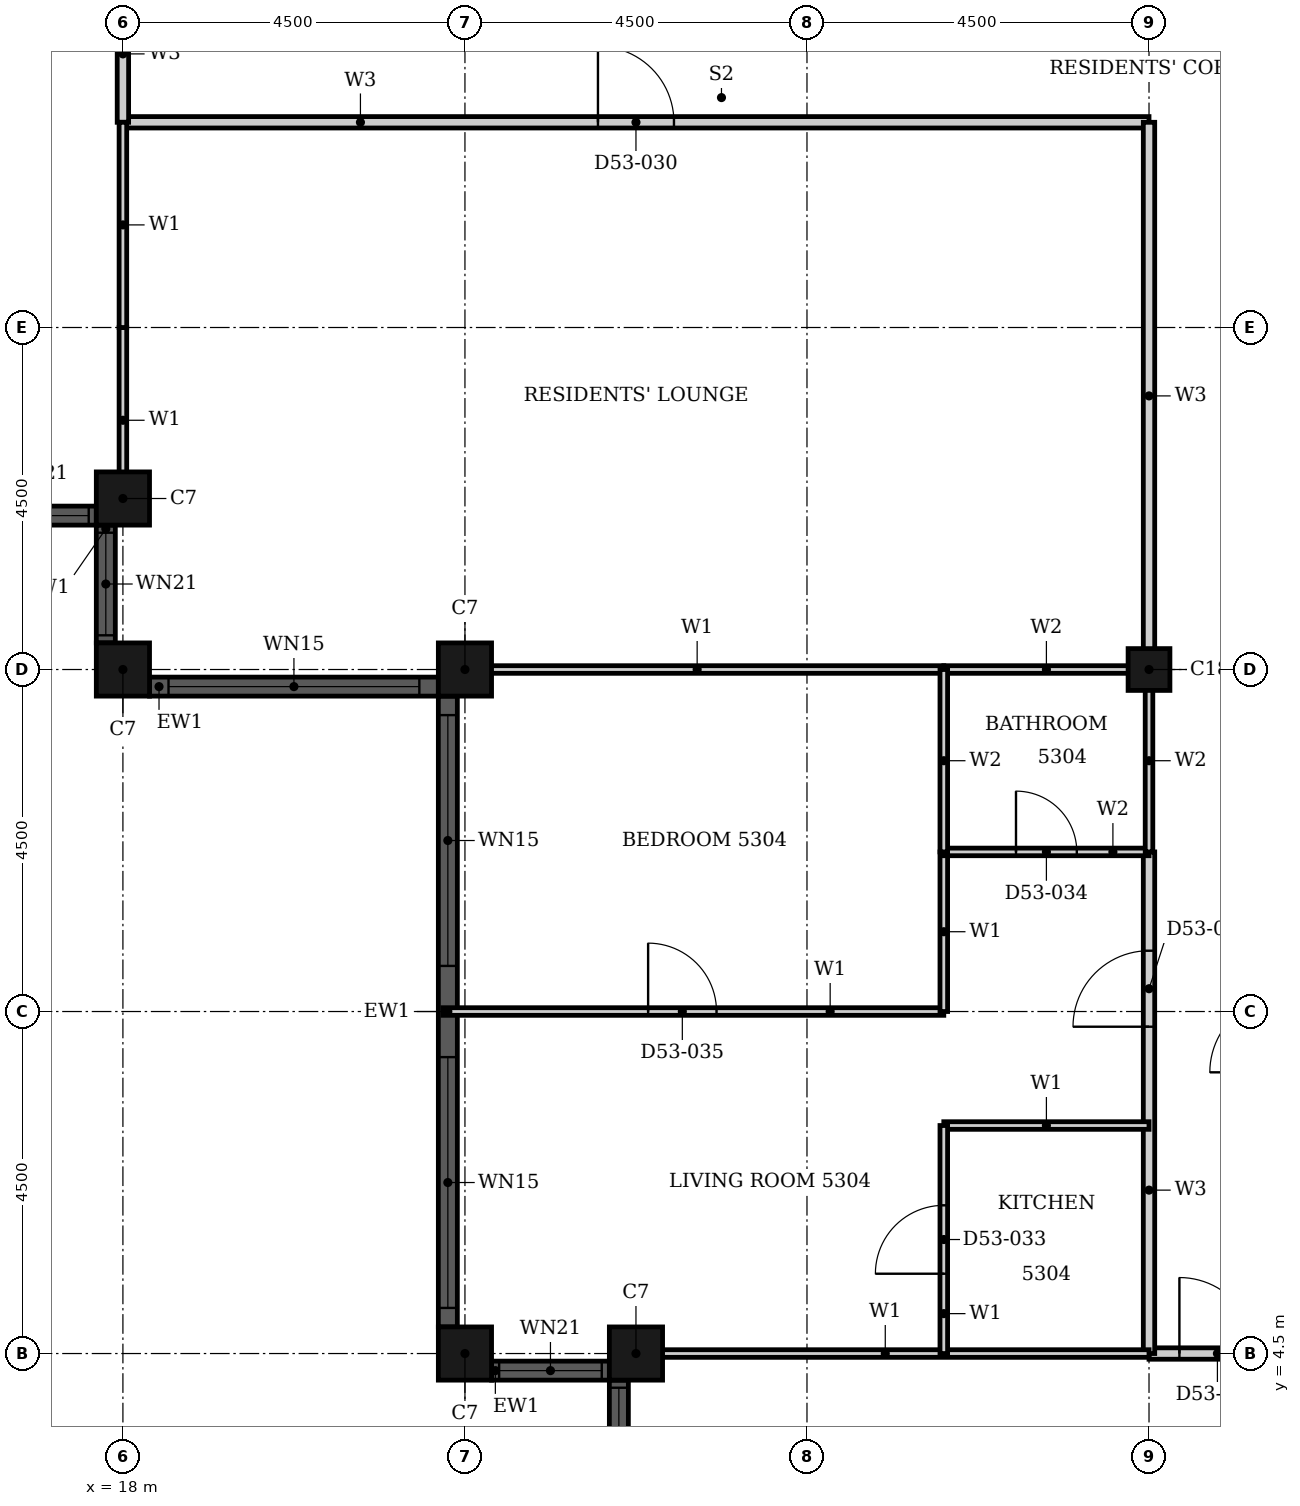
"""IFC4 building model, lengths in metres.
Left out: names, types, materials, properties, quantities, classifications, styles, units other than length and angle.
Written with IfcOpenShell. Run it as: python <this file> out.ifc"""

import sys

from ifc_helpers import new_model, si_unit, direction, frame, frame_2d, origin, origin_2d, place, context, subcontext, project, spatial, rectangle, hollow_rectangle, extrude, element, fill, save


model = new_model("IFC4")
c1 = context("Model", 3, precision=1e-05, world=origin(), true_north=direction((0.0, 1.0)))
c2 = subcontext(c1, "Body", "Model", "MODEL_VIEW")
j1 = project(units=[si_unit("LENGTHUNIT", "METRE"), si_unit("PLANEANGLEUNIT", "RADIAN")], contexts=[c1])
p1 = place(None, origin())
s1 = spatial("IfcSite", under=j1, at=p1, CompositionType="ELEMENT")
p2 = place(p1, origin())
s2 = spatial("IfcBuilding", under=s1, at=p2, CompositionType="ELEMENT")
p3 = place(p2, frame((0.0, 0.0, 210.9)))
s3 = spatial("IfcBuildingStorey", under=s2, at=p3, CompositionType="ELEMENT", Elevation=210.9)
for number, where, z_axis, x_axis in (
    (1, (18.0, 15.75, 0.0), (0.0, 0.0, 1.0), (1.0, 0.0, 0.0)),
    (2, (18.0, 13.5, 0.0), (0.0, 0.0, 1.0), (1.0, 0.0, 0.0)),
    (3, (22.5, 13.5, 0.0), (0.0, 0.0, 1.0), (1.0, 0.0, 0.0)),
    (4, (22.5, 4.5, 0.0), (0.0, 0.0, 1.0), (1.0, 0.0, 0.0)),
    (5, (24.75, 4.5, 0.0), (0.0, 0.0, 1.0), (1.0, 0.0, 0.0)),
):
    element("IfcColumn", number, at=place(p3, frame(where, z_axis=z_axis, x_axis=x_axis)), inside=s3, PredefinedType="COLUMN", context=c2, shape_type="SweptSolid", body=[
        extrude(hollow_rectangle(XDim=0.7, YDim=0.7, WallThickness=0.022, at=origin_2d()), origin(), (0.0, 0.0, 1.0), 3.7),
    ])
p4 = place(p3, frame((31.5, 13.5, 0.0), z_axis=(0.0, 0.0, 1.0), x_axis=(1.0, 0.0, 0.0)))
e6 = element("IfcColumn", 6, at=p4, inside=s3, PredefinedType="COLUMN", context=c2, shape_type="SweptSolid", body=[
    extrude(hollow_rectangle(XDim=0.55, YDim=0.55, WallThickness=0.018, at=origin_2d()), origin(), (0.0, 0.0, 1.0), 3.7),
])
p5 = place(p3, frame((16.1, 15.525, 0.0), z_axis=(0.0, 0.0, 1.0), x_axis=(1.0, 0.0, 0.0)))
e7 = element("IfcWall", 7, at=p5, inside=s3, PredefinedType="SOLIDWALL", context=c2, shape_type="SweptSolid", body=[
    extrude(rectangle(XDim=1.55, YDim=0.25, at=frame_2d((0.775, 0.0))), origin(), (0.0, 0.0, 1.0), 3.7),
])
p6 = place(p5, frame((0.1, 0.0, 0.9)))
e8 = element("IfcOpeningElement", 8, at=p6, cuts=e7, PredefinedType="OPENING", context=c2, shape_type="SweptSolid", body=[
    extrude(rectangle(XDim=1.35, YDim=1.85, at=frame_2d((0.675, 0.925))), frame((0.0, 0.135, 0.0), z_axis=(0.0, -1.0, 0.0), x_axis=(1.0, 0.0, 0.0)), (0.0, 0.0, 1.0), 0.27),
])
p7 = place(p3, frame((17.775, 15.4, 0.0), z_axis=(0.0, 0.0, 1.0), x_axis=(0.0, -1.0, 0.0)))
e9 = element("IfcWall", 9, at=p7, inside=s3, PredefinedType="SOLIDWALL", context=c2, shape_type="SweptSolid", body=[
    extrude(rectangle(XDim=1.55, YDim=0.25, at=frame_2d((0.775, 0.0))), origin(), (0.0, 0.0, 1.0), 3.7),
])
p8 = place(p7, frame((0.1, 0.0, 0.9)))
e10 = element("IfcOpeningElement", 10, at=p8, cuts=e9, PredefinedType="OPENING", context=c2, shape_type="SweptSolid", body=[
    extrude(rectangle(XDim=1.35, YDim=1.85, at=frame_2d((0.675, 0.925))), frame((0.0, 0.135, 0.0), z_axis=(0.0, -1.0, 0.0), x_axis=(1.0, 0.0, 0.0)), (0.0, 0.0, 1.0), 0.27),
])
p9 = place(p3, frame((18.35, 13.275, 0.0), z_axis=(0.0, 0.0, 1.0), x_axis=(1.0, 0.0, 0.0)))
e11 = element("IfcWall", 11, at=p9, inside=s3, PredefinedType="SOLIDWALL", context=c2, shape_type="SweptSolid", body=[
    extrude(rectangle(XDim=3.8, YDim=0.25, at=frame_2d((1.9, 0.0))), origin(), (0.0, 0.0, 1.0), 3.7),
])
p10 = place(p9, frame((0.25, 0.0, 0.45)))
e12 = element("IfcOpeningElement", 12, at=p10, cuts=e11, PredefinedType="OPENING", context=c2, shape_type="SweptSolid", body=[
    extrude(rectangle(XDim=3.3, YDim=2.3, at=frame_2d((1.65, 1.15))), frame((0.0, 0.135, 0.0), z_axis=(0.0, -1.0, 0.0), x_axis=(1.0, 0.0, 0.0)), (0.0, 0.0, 1.0), 0.27),
])
p11 = place(p3, frame((22.275, 13.15, 0.0), z_axis=(0.0, 0.0, 1.0), x_axis=(0.0, -1.0, 0.0)))
e13 = element("IfcWall", 13, at=p11, inside=s3, PredefinedType="SOLIDWALL", context=c2, shape_type="SweptSolid", body=[
    extrude(rectangle(XDim=8.3, YDim=0.25, at=frame_2d((4.15, 0.0))), origin(), (0.0, 0.0, 1.0), 3.7),
])
p12 = place(p11, frame((0.25, 0.0, 0.45)))
e14 = element("IfcOpeningElement", 14, at=p12, cuts=e13, PredefinedType="OPENING", context=c2, shape_type="SweptSolid", body=[
    extrude(rectangle(XDim=3.3, YDim=2.3, at=frame_2d((1.65, 1.15))), frame((0.0, 0.135, 0.0), z_axis=(0.0, -1.0, 0.0), x_axis=(1.0, 0.0, 0.0)), (0.0, 0.0, 1.0), 0.27),
])
p13 = place(p11, frame((4.75, 0.0, 0.45)))
e15 = element("IfcOpeningElement", 15, at=p13, cuts=e13, PredefinedType="OPENING", context=c2, shape_type="SweptSolid", body=[
    extrude(rectangle(XDim=3.3, YDim=2.3, at=frame_2d((1.65, 1.15))), frame((0.0, 0.135, 0.0), z_axis=(0.0, -1.0, 0.0), x_axis=(1.0, 0.0, 0.0)), (0.0, 0.0, 1.0), 0.27),
])
p14 = place(p3, frame((22.85, 4.275, 0.0), z_axis=(0.0, 0.0, 1.0), x_axis=(1.0, 0.0, 0.0)))
e16 = element("IfcWall", 16, at=p14, inside=s3, PredefinedType="SOLIDWALL", context=c2, shape_type="SweptSolid", body=[
    extrude(rectangle(XDim=1.55, YDim=0.25, at=frame_2d((0.775, 0.0))), origin(), (0.0, 0.0, 1.0), 3.7),
])
p15 = place(p14, frame((0.1, 0.0, 0.9)))
e17 = element("IfcOpeningElement", 17, at=p15, cuts=e16, PredefinedType="OPENING", context=c2, shape_type="SweptSolid", body=[
    extrude(rectangle(XDim=1.35, YDim=1.85, at=frame_2d((0.675, 0.925))), frame((0.0, 0.135, 0.0), z_axis=(0.0, -1.0, 0.0), x_axis=(1.0, 0.0, 0.0)), (0.0, 0.0, 1.0), 0.27),
])
p16 = place(p3, frame((24.525, 4.15, 0.0), z_axis=(0.0, 0.0, 1.0), x_axis=(0.0, -1.0, 0.0)))
e18 = element("IfcWall", 18, at=p16, inside=s3, PredefinedType="SOLIDWALL", context=c2, shape_type="SweptSolid", body=[
    extrude(rectangle(XDim=1.55, YDim=0.25, at=frame_2d((0.775, 0.0))), origin(), (0.0, 0.0, 1.0), 3.7),
])
p17 = place(p16, frame((0.1, 0.0, 0.9)))
e19 = element("IfcOpeningElement", 19, at=p17, cuts=e18, PredefinedType="OPENING", context=c2, shape_type="SweptSolid", body=[
    extrude(rectangle(XDim=1.35, YDim=1.85, at=frame_2d((0.675, 0.925))), frame((0.0, 0.135, 0.0), z_axis=(0.0, -1.0, 0.0), x_axis=(1.0, 0.0, 0.0)), (0.0, 0.0, 1.0), 0.27),
])
p18 = place(p3, frame((18.0, 20.7, 0.0), z_axis=(0.0, 0.0, 1.0), x_axis=(1.0, 0.0, 0.0)))
e20 = element("IfcWall", 20, at=p18, inside=s3, PredefinedType="PARTITIONING", context=c2, shape_type="SweptSolid", body=[
    extrude(rectangle(XDim=13.5, YDim=0.15, at=frame_2d((6.75, 0.0))), origin(), (0.0, 0.0, 1.0), 3.4),
])
p19 = place(p18, frame((6.25, 0.0, 0.0)))
e21 = element("IfcOpeningElement", 21, at=p19, cuts=e20, PredefinedType="OPENING", context=c2, shape_type="SweptSolid", body=[
    extrude(rectangle(XDim=1.0, YDim=2.1, at=frame_2d((0.5, 1.05))), frame((0.0, 0.085, 0.0), z_axis=(0.0, -1.0, 0.0), x_axis=(1.0, 0.0, 0.0)), (0.0, 0.0, 1.0), 0.17),
])
p20 = place(p3, frame((31.5, 4.5, 0.0), z_axis=(0.0, 0.0, 1.0), x_axis=(1.0, 0.0, 0.0)))
e22 = element("IfcWall", 22, at=p20, inside=s3, PredefinedType="PARTITIONING", context=c2, shape_type="SweptSolid", body=[
    extrude(rectangle(XDim=1.8, YDim=0.15, at=frame_2d((0.9, 0.0))), origin(), (0.0, 0.0, 1.0), 3.4),
])
p21 = place(p20, frame((0.4, 0.0, 0.0)))
e23 = element("IfcOpeningElement", 23, at=p21, cuts=e22, PredefinedType="OPENING", context=c2, shape_type="SweptSolid", body=[
    extrude(rectangle(XDim=1.0, YDim=2.1, at=frame_2d((0.5, 1.05))), frame((0.0, 0.085, 0.0), z_axis=(0.0, -1.0, 0.0), x_axis=(1.0, 0.0, 0.0)), (0.0, 0.0, 1.0), 0.17),
])
p22 = place(p3, frame((18.0, 20.7, 0.0), z_axis=(0.0, 0.0, 1.0), x_axis=(0.0, 1.0, 0.0)))
e24 = element("IfcWall", 24, at=p22, inside=s3, PredefinedType="PARTITIONING", context=c2, shape_type="SweptSolid", body=[
    extrude(rectangle(XDim=1.8, YDim=0.15, at=frame_2d((0.9, 0.0))), origin(), (0.0, 0.0, 1.0), 3.4),
])
p23 = place(p3, frame((31.5, 4.5, 0.0), z_axis=(0.0, 0.0, 1.0), x_axis=(0.0, 1.0, 0.0)))
e25 = element("IfcWall", 25, at=p23, inside=s3, PredefinedType="PARTITIONING", context=c2, shape_type="SweptSolid", body=[
    extrude(rectangle(XDim=6.6, YDim=0.15, at=frame_2d((3.3, 0.0))), origin(), (0.0, 0.0, 1.0), 2.68),
])
p24 = place(p23, frame((4.3, 0.0, 0.0)))
e26 = element("IfcOpeningElement", 26, at=p24, cuts=e25, PredefinedType="OPENING", context=c2, shape_type="SweptSolid", body=[
    extrude(rectangle(XDim=1.0, YDim=2.2, at=frame_2d((0.5, 1.1))), frame((0.0, 0.085, 0.0), z_axis=(0.0, -1.0, 0.0), x_axis=(1.0, 0.0, 0.0)), (0.0, 0.0, 1.0), 0.17),
])
p25 = place(p3, frame((31.5, 13.5, 0.0), z_axis=(0.0, 0.0, 1.0), x_axis=(0.0, 1.0, 0.0)))
e27 = element("IfcWall", 27, at=p25, inside=s3, PredefinedType="PARTITIONING", context=c2, shape_type="SweptSolid", body=[
    extrude(rectangle(XDim=7.2, YDim=0.15, at=frame_2d((3.6, 0.0))), origin(), (0.0, 0.0, 1.0), 3.4),
])
p26 = place(p3, frame((22.31, 13.5, 0.0), z_axis=(0.0, 0.0, 1.0), x_axis=(1.0, 0.0, 0.0)))
e28 = element("IfcWall", 28, at=p26, inside=s3, PredefinedType="PARTITIONING", context=c2, shape_type="SweptSolid", body=[
    extrude(rectangle(XDim=6.49, YDim=0.1, at=frame_2d((3.245, 0.0))), origin(), (0.0, 0.0, 1.0), 2.48),
])
p27 = place(p3, frame((24.56, 4.5, 0.0), z_axis=(0.0, 0.0, 1.0), x_axis=(1.0, 0.0, 0.0)))
e29 = element("IfcWall", 29, at=p27, inside=s3, PredefinedType="PARTITIONING", context=c2, shape_type="SweptSolid", body=[
    extrude(rectangle(XDim=6.94, YDim=0.1, at=frame_2d((3.47, 0.0))), origin(), (0.0, 0.0, 1.0), 3.4),
])
p28 = place(p3, frame((28.8, 7.5, 0.0), z_axis=(0.0, 0.0, 1.0), x_axis=(1.0, 0.0, 0.0)))
e30 = element("IfcWall", 30, at=p28, inside=s3, PredefinedType="PARTITIONING", context=c2, shape_type="SweptSolid", body=[
    extrude(rectangle(XDim=2.7, YDim=0.1, at=frame_2d((1.35, 0.0))), origin(), (0.0, 0.0, 1.0), 3.4),
])
p29 = place(p3, frame((22.21, 9.0, 0.0), z_axis=(0.0, 0.0, 1.0), x_axis=(1.0, 0.0, 0.0)))
e31 = element("IfcWall", 31, at=p29, inside=s3, PredefinedType="PARTITIONING", context=c2, shape_type="SweptSolid", body=[
    extrude(rectangle(XDim=6.59, YDim=0.1, at=frame_2d((3.295, 0.0))), origin(), (0.0, 0.0, 1.0), 3.4),
])
p30 = place(p29, frame((2.7, 0.0, 0.0)))
e32 = element("IfcOpeningElement", 32, at=p30, cuts=e31, PredefinedType="OPENING", context=c2, shape_type="SweptSolid", body=[
    extrude(rectangle(XDim=0.9, YDim=2.1, at=frame_2d((0.45, 1.05))), frame((0.0, 0.06, 0.0), z_axis=(0.0, -1.0, 0.0), x_axis=(1.0, 0.0, 0.0)), (0.0, 0.0, 1.0), 0.12),
])
p31 = place(p3, frame((18.0, 15.56, 0.0), z_axis=(0.0, 0.0, 1.0), x_axis=(0.0, 1.0, 0.0)))
e33 = element("IfcWall", 33, at=p31, inside=s3, PredefinedType="PARTITIONING", context=c2, shape_type="SweptSolid", body=[
    extrude(rectangle(XDim=2.439, YDim=0.1, at=frame_2d((1.219, 0.0))), origin(), (0.0, 0.0, 1.0), 3.4),
])
p32 = place(p3, frame((18.0, 18.0, 0.0), z_axis=(0.0, 0.0, 1.0), x_axis=(0.0, 1.0, 0.0)))
e34 = element("IfcWall", 34, at=p32, inside=s3, PredefinedType="PARTITIONING", context=c2, shape_type="SweptSolid", body=[
    extrude(rectangle(XDim=2.7, YDim=0.1, at=frame_2d((1.35, 0.0))), origin(), (0.0, 0.0, 1.0), 3.4),
])
p33 = place(p3, frame((28.8, 9.0, 0.0), z_axis=(0.0, 0.0, 1.0), x_axis=(0.0, 1.0, 0.0)))
e35 = element("IfcWall", 35, at=p33, inside=s3, PredefinedType="PARTITIONING", context=c2, shape_type="SweptSolid", body=[
    extrude(rectangle(XDim=2.1, YDim=0.1, at=frame_2d((1.05, 0.0))), origin(), (0.0, 0.0, 1.0), 3.4),
])
p34 = place(p3, frame((28.8, 4.5, 0.0), z_axis=(0.0, 0.0, 1.0), x_axis=(0.0, 1.0, 0.0)))
e36 = element("IfcWall", 36, at=p34, inside=s3, PredefinedType="PARTITIONING", context=c2, shape_type="SweptSolid", body=[
    extrude(rectangle(XDim=3.0, YDim=0.1, at=frame_2d((1.5, 0.0))), origin(), (0.0, 0.0, 1.0), 3.4),
])
p35 = place(p34, frame((1.05, 0.0, 0.0)))
e37 = element("IfcOpeningElement", 37, at=p35, cuts=e36, PredefinedType="OPENING", context=c2, shape_type="SweptSolid", body=[
    extrude(rectangle(XDim=0.9, YDim=2.1, at=frame_2d((0.45, 1.05))), frame((0.0, 0.06, 0.0), z_axis=(0.0, -1.0, 0.0), x_axis=(1.0, 0.0, 0.0)), (0.0, 0.0, 1.0), 0.12),
])
p36 = place(p3, frame((28.8, 11.1, 0.0), z_axis=(0.0, 0.0, 1.0), x_axis=(1.0, 0.0, 0.0)))
e38 = element("IfcWall", 38, at=p36, inside=s3, PredefinedType="PARTITIONING", context=c2, shape_type="SweptSolid", body=[
    extrude(rectangle(XDim=2.7, YDim=0.1, at=frame_2d((1.35, 0.0))), origin(), (0.0, 0.0, 1.0), 3.4),
])
p37 = place(p36, frame((0.95, 0.0, 0.0)))
e39 = element("IfcOpeningElement", 39, at=p37, cuts=e38, PredefinedType="OPENING", context=c2, shape_type="SweptSolid", body=[
    extrude(rectangle(XDim=0.8, YDim=2.1, at=frame_2d((0.4, 1.05))), frame((0.0, 0.06, 0.0), z_axis=(0.0, -1.0, 0.0), x_axis=(1.0, 0.0, 0.0)), (0.0, 0.0, 1.0), 0.12),
])
p38 = place(p3, frame((28.8, 13.5, 0.0), z_axis=(0.0, 0.0, 1.0), x_axis=(1.0, 0.0, 0.0)))
e40 = element("IfcWall", 40, at=p38, inside=s3, PredefinedType="PARTITIONING", context=c2, shape_type="SweptSolid", body=[
    extrude(rectangle(XDim=2.7, YDim=0.1, at=frame_2d((1.35, 0.0))), origin(), (0.0, 0.0, 1.0), 2.48),
])
p39 = place(p3, frame((28.8, 11.1, 0.0), z_axis=(0.0, 0.0, 1.0), x_axis=(0.0, 1.0, 0.0)))
e41 = element("IfcWall", 41, at=p39, inside=s3, PredefinedType="PARTITIONING", context=c2, shape_type="SweptSolid", body=[
    extrude(rectangle(XDim=2.4, YDim=0.1, at=frame_2d((1.2, 0.0))), origin(), (0.0, 0.0, 1.0), 3.4),
])
p40 = place(p3, frame((31.5, 11.1, 0.0), z_axis=(0.0, 0.0, 1.0), x_axis=(0.0, 1.0, 0.0)))
e42 = element("IfcWall", 42, at=p40, inside=s3, PredefinedType="PARTITIONING", context=c2, shape_type="SweptSolid", body=[
    extrude(rectangle(XDim=2.4, YDim=0.1, at=frame_2d((1.2, 0.0))), origin(), (0.0, 0.0, 1.0), 2.68),
])
p41 = place(p6, origin())
e43 = element("IfcWindow", 43, at=p41, inside=s3, PartitioningType="SINGLE_PANEL", PredefinedType="WINDOW", context=c2, shape_type="SweptSolid", body=[
    extrude(rectangle(XDim=1.35, YDim=1.85, at=frame_2d((0.675, 0.925))), frame((0.0, 0.03, 0.0), z_axis=(0.0, -1.0, 0.0), x_axis=(1.0, 0.0, 0.0)), (0.0, 0.0, 1.0), 0.06),
])
fill(e8, e43)
p42 = place(p8, origin())
e44 = element("IfcWindow", 44, at=p42, inside=s3, PartitioningType="SINGLE_PANEL", PredefinedType="WINDOW", context=c2, shape_type="SweptSolid", body=[
    extrude(rectangle(XDim=1.35, YDim=1.85, at=frame_2d((0.675, 0.925))), frame((0.0, 0.03, 0.0), z_axis=(0.0, -1.0, 0.0), x_axis=(1.0, 0.0, 0.0)), (0.0, 0.0, 1.0), 0.06),
])
fill(e10, e44)
p43 = place(p10, origin())
e45 = element("IfcWindow", 45, at=p43, inside=s3, PartitioningType="SINGLE_PANEL", PredefinedType="WINDOW", context=c2, shape_type="SweptSolid", body=[
    extrude(rectangle(XDim=3.3, YDim=2.3, at=frame_2d((1.65, 1.15))), frame((0.0, 0.03, 0.0), z_axis=(0.0, -1.0, 0.0), x_axis=(1.0, 0.0, 0.0)), (0.0, 0.0, 1.0), 0.06),
])
fill(e12, e45)
p44 = place(p12, origin())
e46 = element("IfcWindow", 46, at=p44, inside=s3, PartitioningType="SINGLE_PANEL", PredefinedType="WINDOW", context=c2, shape_type="SweptSolid", body=[
    extrude(rectangle(XDim=3.3, YDim=2.3, at=frame_2d((1.65, 1.15))), frame((0.0, 0.03, 0.0), z_axis=(0.0, -1.0, 0.0), x_axis=(1.0, 0.0, 0.0)), (0.0, 0.0, 1.0), 0.06),
])
fill(e14, e46)
p45 = place(p13, origin())
e47 = element("IfcWindow", 47, at=p45, inside=s3, PartitioningType="SINGLE_PANEL", PredefinedType="WINDOW", context=c2, shape_type="SweptSolid", body=[
    extrude(rectangle(XDim=3.3, YDim=2.3, at=frame_2d((1.65, 1.15))), frame((0.0, 0.03, 0.0), z_axis=(0.0, -1.0, 0.0), x_axis=(1.0, 0.0, 0.0)), (0.0, 0.0, 1.0), 0.06),
])
fill(e15, e47)
p46 = place(p15, origin())
e48 = element("IfcWindow", 48, at=p46, inside=s3, PartitioningType="SINGLE_PANEL", PredefinedType="WINDOW", context=c2, shape_type="SweptSolid", body=[
    extrude(rectangle(XDim=1.35, YDim=1.85, at=frame_2d((0.675, 0.925))), frame((0.0, 0.03, 0.0), z_axis=(0.0, -1.0, 0.0), x_axis=(1.0, 0.0, 0.0)), (0.0, 0.0, 1.0), 0.06),
])
fill(e17, e48)
p47 = place(p17, origin())
e49 = element("IfcWindow", 49, at=p47, inside=s3, PartitioningType="SINGLE_PANEL", PredefinedType="WINDOW", context=c2, shape_type="SweptSolid", body=[
    extrude(rectangle(XDim=1.35, YDim=1.85, at=frame_2d((0.675, 0.925))), frame((0.0, 0.03, 0.0), z_axis=(0.0, -1.0, 0.0), x_axis=(1.0, 0.0, 0.0)), (0.0, 0.0, 1.0), 0.06),
])
fill(e19, e49)
p48 = place(p19, origin())
e50 = element("IfcDoor", 50, at=p48, inside=s3, OperationType="SINGLE_SWING_RIGHT", PredefinedType="DOOR", context=c2, shape_type="SweptSolid", body=[
    extrude(rectangle(XDim=1.0, YDim=2.1, at=frame_2d((0.5, 1.05))), frame((0.0, 0.025, 0.0), z_axis=(0.0, -1.0, 0.0), x_axis=(1.0, 0.0, 0.0)), (0.0, 0.0, 1.0), 0.05),
])
fill(e21, e50)
p49 = place(p24, origin())
e51 = element("IfcDoor", 51, at=p49, inside=s3, OperationType="SINGLE_SWING_LEFT", PredefinedType="DOOR", context=c2, shape_type="SweptSolid", body=[
    extrude(rectangle(XDim=1.0, YDim=2.2, at=frame_2d((0.5, 1.1))), frame((0.0, 0.025, 0.0), z_axis=(0.0, -1.0, 0.0), x_axis=(1.0, 0.0, 0.0)), (0.0, 0.0, 1.0), 0.05),
])
fill(e26, e51)
p50 = place(p35, origin())
e52 = element("IfcDoor", 52, at=p50, inside=s3, OperationType="SINGLE_SWING_RIGHT", PredefinedType="DOOR", context=c2, shape_type="SweptSolid", body=[
    extrude(rectangle(XDim=0.9, YDim=2.1, at=frame_2d((0.45, 1.05))), frame((0.0, 0.025, 0.0), z_axis=(0.0, -1.0, 0.0), x_axis=(1.0, 0.0, 0.0)), (0.0, 0.0, 1.0), 0.05),
])
fill(e37, e52)
p51 = place(p37, origin())
e53 = element("IfcDoor", 53, at=p51, inside=s3, OperationType="SINGLE_SWING_LEFT", PredefinedType="DOOR", context=c2, shape_type="SweptSolid", body=[
    extrude(rectangle(XDim=0.8, YDim=2.1, at=frame_2d((0.4, 1.05))), frame((0.0, 0.025, 0.0), z_axis=(0.0, -1.0, 0.0), x_axis=(1.0, 0.0, 0.0)), (0.0, 0.0, 1.0), 0.05),
])
fill(e39, e53)
p52 = place(p30, origin())
e54 = element("IfcDoor", 54, at=p52, inside=s3, OperationType="SINGLE_SWING_LEFT", PredefinedType="DOOR", context=c2, shape_type="SweptSolid", body=[
    extrude(rectangle(XDim=0.9, YDim=2.1, at=frame_2d((0.45, 1.05))), frame((0.0, 0.025, 0.0), z_axis=(0.0, -1.0, 0.0), x_axis=(1.0, 0.0, 0.0)), (0.0, 0.0, 1.0), 0.05),
])
fill(e32, e54)
p53 = place(p21, origin())
e55 = element("IfcDoor", 55, at=p53, inside=s3, OperationType="SINGLE_SWING_LEFT", PredefinedType="DOOR", context=c2, shape_type="SweptSolid", body=[
    extrude(rectangle(XDim=1.0, YDim=2.1, at=frame_2d((0.5, 1.05))), frame((0.0, 0.025, 0.0), z_axis=(0.0, -1.0, 0.0), x_axis=(1.0, 0.0, 0.0)), (0.0, 0.0, 1.0), 0.05),
])
fill(e23, e55)
save(model, sys.argv[1])
